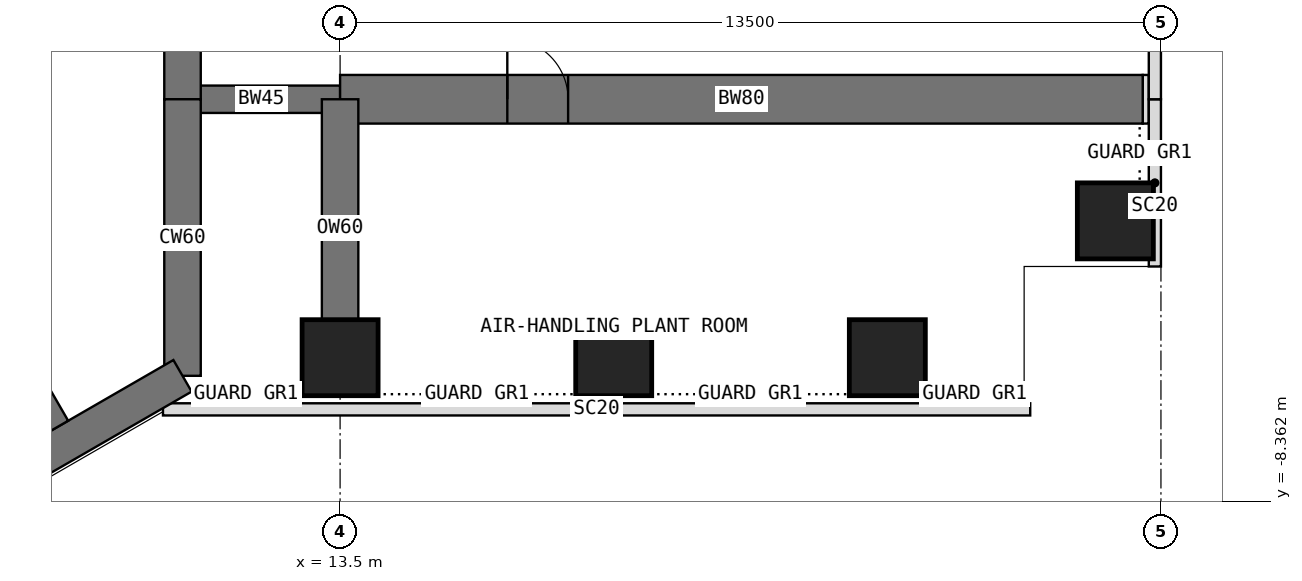
"""IFC4 building model, lengths in metres.
Left out: names, types, materials, properties, quantities, classifications, styles, units other than length and angle.
Written with IfcOpenShell. Run it as: python <this file> out.ifc"""

import sys

from ifc_helpers import new_model, si_unit, direction, frame, frame_2d, origin, origin_2d, place, context, subcontext, project, spatial, rectangle, extrude, element, fill, save


model = new_model("IFC4")
c1 = context("Model", 3, precision=1e-05, world=origin(), true_north=direction((0.0, 1.0)))
c2 = subcontext(c1, "Body", "Model", "MODEL_VIEW")
j1 = project(units=[si_unit("LENGTHUNIT", "METRE"), si_unit("PLANEANGLEUNIT", "RADIAN")], contexts=[c1])
p1 = place(None, origin())
s1 = spatial("IfcSite", under=j1, at=p1, CompositionType="ELEMENT")
p2 = place(p1, origin())
s2 = spatial("IfcBuilding", under=s1, at=p2, CompositionType="ELEMENT")
p3 = place(p2, frame((0.0, 0.0, 165.5)))
s3 = spatial("IfcBuildingStorey", under=s2, at=p3, CompositionType="ELEMENT", Elevation=165.5)
p4 = place(p3, frame((10.908, -6.298, 0.0), z_axis=(0.0, 0.0, 1.0), x_axis=(0.0, 1.0, 0.0)))
e1 = element("IfcWall", 1, at=p4, inside=s3, PredefinedType="SHEAR", context=c2, shape_type="SweptSolid", body=[
    extrude(rectangle(XDim=4.548, YDim=0.6, at=frame_2d((2.274, 0.0))), origin(), (0.0, 0.0, 1.0), 5.0),
])
p5 = place(p3, frame((10.908, -1.75, 0.0), z_axis=(0.0, 0.0, 1.0), x_axis=(0.0, 1.0, 0.0)))
e2 = element("IfcWall", 2, at=p5, inside=s3, PredefinedType="SHEAR", context=c2, shape_type="SweptSolid", body=[
    extrude(rectangle(XDim=3.5, YDim=0.6, at=frame_2d((1.75, 0.0))), origin(), (0.0, 0.0, 1.0), 5.0),
])
p6 = place(p5, frame((0.85, 0.0, 0.0)))
e3 = element("IfcOpeningElement", 3, at=p6, cuts=e2, PredefinedType="OPENING", context=c2, shape_type="SweptSolid", body=[
    extrude(rectangle(XDim=1.8, YDim=2.1, at=frame_2d((0.9, 1.05))), frame((0.0, 0.31, 0.0), z_axis=(0.0, -1.0, 0.0), x_axis=(1.0, 0.0, 0.0)), (0.0, 0.0, 1.0), 0.62),
])
p7 = place(p3, frame((0.0, -12.596, 0.0), z_axis=(0.0, 0.0, 1.0), x_axis=(0.866021940709, 0.500005998175, 0.0)))
e4 = element("IfcWall", 4, at=p7, inside=s3, PredefinedType="SHEAR", context=c2, shape_type="SweptSolid", body=[
    extrude(rectangle(XDim=12.596, YDim=0.6, at=frame_2d((6.298, 0.0))), origin(), (0.0, 0.0, 1.0), 5.0),
])
p8 = place(p3, frame((10.908, -1.75, 0.0), z_axis=(0.0, 0.0, 1.0), x_axis=(1.0, 0.0, 0.0)))
e5 = element("IfcWall", 5, at=p8, inside=s3, PredefinedType="SHEAR", context=c2, shape_type="SweptSolid", body=[
    extrude(rectangle(XDim=2.592, YDim=0.45, at=frame_2d((1.296, 0.0))), origin(), (0.0, 0.0, 1.0), 5.0),
])
p9 = place(p3, frame((13.5, -1.75, 0.0), z_axis=(0.0, 0.0, 1.0), x_axis=(1.0, 0.0, 0.0)))
e6 = element("IfcWall", 6, at=p9, inside=s3, PredefinedType="SHEAR", context=c2, shape_type="SweptSolid", body=[
    extrude(rectangle(XDim=13.2, YDim=0.8, at=frame_2d((6.6, 0.0))), origin(), (0.0, 0.0, 1.0), 5.0),
])
p10 = place(p9, frame((2.75, 0.0, 0.0)))
e7 = element("IfcOpeningElement", 7, at=p10, cuts=e6, PredefinedType="OPENING", context=c2, shape_type="SweptSolid", body=[
    extrude(rectangle(XDim=1.0, YDim=2.1, at=frame_2d((0.5, 1.05))), frame((0.0, 0.41, 0.0), z_axis=(0.0, -1.0, 0.0), x_axis=(1.0, 0.0, 0.0)), (0.0, 0.0, 1.0), 0.82),
])
for number, where, z_axis, x_axis in (
    (8, (13.5, -6.0, 0.0), (0.0, 0.0, 1.0), (1.0, 0.0, 0.0)),
    (9, (18.0, -6.0, 0.0), (0.0, 0.0, 1.0), (1.0, 0.0, 0.0)),
    (10, (22.5, -6.0, 0.0), (0.0, 0.0, 1.0), (1.0, 0.0, 0.0)),
    (11, (26.25, -3.75, 0.0), (0.0, 0.0, 1.0), (1.0, 0.0, 0.0)),
):
    element("IfcColumn", number, at=place(p3, frame(where, z_axis=z_axis, x_axis=x_axis)), inside=s3, PredefinedType="COLUMN", context=c2, shape_type="SweptSolid", body=[
        extrude(rectangle(XDim=1.25, YDim=1.25, at=origin_2d()), origin(), (0.0, 0.0, 1.0), 5.0),
    ])
p11 = place(p3, frame((13.5, -1.75, 0.0), z_axis=(0.0, 0.0, 1.0), x_axis=(0.0, -1.0, 0.0)))
e12 = element("IfcWall", 12, at=p11, inside=s3, PredefinedType="SHEAR", context=c2, shape_type="SweptSolid", body=[
    extrude(rectangle(XDim=4.25, YDim=0.6, at=frame_2d((2.125, 0.0))), origin(), (0.0, 0.0, 1.0), 5.0),
])
p12 = place(p3, frame((24.85, -6.85, 0.0), z_axis=(0.0, 0.0, 1.0), x_axis=(-1.0, 0.0, 0.0)))
e13 = element("IfcWall", 13, at=p12, inside=s3, PredefinedType="USERDEFINED", context=c2, shape_type="SweptSolid", body=[
    extrude(rectangle(XDim=14.263, YDim=0.2, at=frame_2d((7.131, 0.0))), origin(), (0.0, 0.0, 1.0), 4.8),
])
p13 = place(p3, frame((26.9, -4.5, 0.0), z_axis=(0.0, 0.0, 1.0), x_axis=(0.0, 1.0, 0.0)))
e14 = element("IfcWall", 14, at=p13, inside=s3, PredefinedType="USERDEFINED", context=c2, shape_type="SweptSolid", body=[
    extrude(rectangle(XDim=2.75, YDim=0.2, at=frame_2d((1.375, 0.0))), origin(), (0.0, 0.0, 1.0), 4.8),
])
p14 = place(p3, frame((26.9, -1.75, 0.0), z_axis=(0.0, 0.0, 1.0), x_axis=(0.0, 1.0, 0.0)))
e15 = element("IfcWall", 15, at=p14, inside=s3, PredefinedType="STANDARD", context=c2, shape_type="SweptSolid", body=[
    extrude(rectangle(XDim=3.5, YDim=0.2, at=frame_2d((1.75, 0.0))), origin(), (0.0, 0.0, 1.0), 4.8),
])
p15 = place(p14, frame((0.85, 0.0, 0.0)))
e16 = element("IfcOpeningElement", 16, at=p15, cuts=e15, PredefinedType="OPENING", context=c2, shape_type="SweptSolid", body=[
    extrude(rectangle(XDim=1.8, YDim=2.4, at=frame_2d((0.9, 1.2))), frame((0.0, 0.11, 0.0), z_axis=(0.0, -1.0, 0.0), x_axis=(1.0, 0.0, 0.0)), (0.0, 0.0, 1.0), 0.22),
])
p16 = place(p3, frame((26.7, -1.75, 0.0), z_axis=(0.0, 0.0, 1.0), x_axis=(1.0, 0.0, 0.0)))
e17 = element("IfcWall", 17, at=p16, inside=s3, PredefinedType="PARTITIONING", context=c2, shape_type="SweptSolid", body=[
    extrude(rectangle(XDim=0.1, YDim=0.8, at=frame_2d((0.05, 0.0))), origin(), (0.0, 0.0, 1.0), 4.8),
])
p17 = place(p3, frame((5.901, -2.02, 0.0), z_axis=(0.0, 0.0, 1.0), x_axis=(0.500027676417, -0.866009424208, 0.0)))
e18 = element("IfcWall", 18, at=p17, inside=s3, PredefinedType="SHEAR", context=c2, shape_type="SweptSolid", body=[
    extrude(rectangle(XDim=5.908, YDim=0.4, at=frame_2d((2.954, 0.0))), origin(), (0.0, 0.0, 1.0), 5.0),
])
p18 = place(p10, origin())
e19 = element("IfcDoor", 19, at=p18, inside=s3, OperationType="SINGLE_SWING_LEFT", PredefinedType="DOOR", context=c2, shape_type="SweptSolid", body=[
    extrude(rectangle(XDim=0.92, YDim=2.06, at=frame_2d((0.5, 1.03))), frame((0.0, 0.025, 0.0), z_axis=(0.0, -1.0, 0.0), x_axis=(1.0, 0.0, 0.0)), (0.0, 0.0, 1.0), 0.05),
    extrude(rectangle(XDim=0.04, YDim=2.1, at=frame_2d((0.02, 1.05))), frame((0.0, 0.4, 0.0), z_axis=(0.0, -1.0, 0.0), x_axis=(1.0, 0.0, 0.0)), (0.0, 0.0, 1.0), 0.8),
    extrude(rectangle(XDim=0.04, YDim=2.1, at=frame_2d((0.98, 1.05))), frame((0.0, 0.4, 0.0), z_axis=(0.0, -1.0, 0.0), x_axis=(1.0, 0.0, 0.0)), (0.0, 0.0, 1.0), 0.8),
    extrude(rectangle(XDim=0.92, YDim=0.04, at=frame_2d((0.5, 2.08))), frame((0.0, 0.4, 0.0), z_axis=(0.0, -1.0, 0.0), x_axis=(1.0, 0.0, 0.0)), (0.0, 0.0, 1.0), 0.8),
])
fill(e7, e19)
save(model, sys.argv[1])
